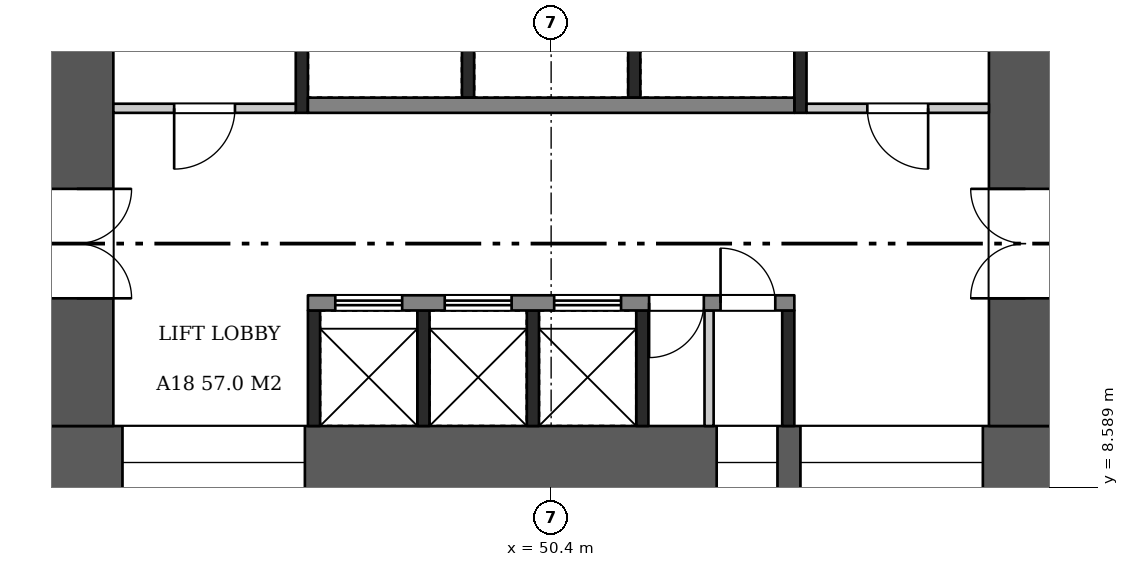
"""IFC4 building model, lengths in metres.
Left out: names, types, materials, properties, quantities, classifications, styles, units other than length and angle.
Written with IfcOpenShell. Run it as: python <this file> out.ifc"""

import sys

from ifc_helpers import new_model, si_unit, direction, frame, frame_2d, origin, place, context, subcontext, project, spatial, rectangle, extrude, element, fill, save


model = new_model("IFC4")
c1 = context("Model", 3, precision=1e-05, world=origin(), true_north=direction((0.0, 1.0)))
c2 = subcontext(c1, "Body", "Model", "MODEL_VIEW")
j1 = project(units=[si_unit("LENGTHUNIT", "METRE"), si_unit("PLANEANGLEUNIT", "RADIAN")], contexts=[c1])
p1 = place(None, origin())
s1 = spatial("IfcSite", under=j1, at=p1, CompositionType="ELEMENT")
p2 = place(p1, origin())
s2 = spatial("IfcBuilding", under=s1, at=p2, CompositionType="ELEMENT")
p3 = place(p2, frame((0.0, 0.0, 74.2)))
s3 = spatial("IfcBuildingStorey", under=s2, at=p3, CompositionType="ELEMENT", Elevation=74.2)
p4 = place(p3, frame((42.0, 9.0, 0.0), z_axis=(0.0, 0.0, 1.0), x_axis=(1.0, 0.0, 0.0)))
e1 = element("IfcWall", 1, at=p4, inside=s3, PredefinedType="SHEAR", context=c2, shape_type="SweptSolid", body=[
    extrude(rectangle(XDim=16.8, YDim=1.2, at=frame_2d((8.4, 0.0))), origin(), (0.0, 0.0, 1.0), 6.72),
])
p5 = place(p4, frame((1.35, 0.0, 0.6)))
e2 = element("IfcOpeningElement", 2, at=p5, cuts=e1, PredefinedType="OPENING", context=c2, shape_type="SweptSolid", body=[
    extrude(rectangle(XDim=3.0, YDim=2.1, at=frame_2d((1.5, 1.05))), frame((0.0, 0.61, 0.0), z_axis=(0.0, -1.0, 0.0), x_axis=(1.0, 0.0, 0.0)), (0.0, 0.0, 1.0), 1.22),
])
p6 = place(p4, frame((11.123, 0.0, 1.6)))
e3 = element("IfcOpeningElement", 3, at=p6, cuts=e1, PredefinedType="OPENING", context=c2, shape_type="SweptSolid", body=[
    extrude(rectangle(XDim=1.0, YDim=1.2, at=frame_2d((0.5, 0.6))), frame((0.0, 0.61, 0.0), z_axis=(0.0, -1.0, 0.0), x_axis=(1.0, 0.0, 0.0)), (0.0, 0.0, 1.0), 1.22),
])
p7 = place(p4, frame((12.5, 0.0, 0.6)))
e4 = element("IfcOpeningElement", 4, at=p7, cuts=e1, PredefinedType="OPENING", context=c2, shape_type="SweptSolid", body=[
    extrude(rectangle(XDim=3.0, YDim=2.1, at=frame_2d((1.5, 1.05))), frame((0.0, 0.61, 0.0), z_axis=(0.0, -1.0, 0.0), x_axis=(1.0, 0.0, 0.0)), (0.0, 0.0, 1.0), 1.22),
])
p8 = place(p3, frame((42.6, 9.6, 0.0), z_axis=(0.0, 0.0, 1.0), x_axis=(0.0, 1.0, 0.0)))
e5 = element("IfcWall", 5, at=p8, inside=s3, PredefinedType="SHEAR", context=c2, shape_type="SweptSolid", body=[
    extrude(rectangle(XDim=14.4, YDim=1.2, at=frame_2d((7.2, 0.0))), origin(), (0.0, 0.0, 1.0), 6.72),
])
p9 = place(p8, frame((2.1, 0.0, 0.0)))
e6 = element("IfcOpeningElement", 6, at=p9, cuts=e5, PredefinedType="OPENING", context=c2, shape_type="SweptSolid", body=[
    extrude(rectangle(XDim=1.8, YDim=2.1, at=frame_2d((0.9, 1.05))), frame((0.0, 0.61, 0.0), z_axis=(0.0, -1.0, 0.0), x_axis=(1.0, 0.0, 0.0)), (0.0, 0.0, 1.0), 1.22),
])
p10 = place(p3, frame((58.2, 9.6, 0.0), z_axis=(0.0, 0.0, 1.0), x_axis=(0.0, 1.0, 0.0)))
e7 = element("IfcWall", 7, at=p10, inside=s3, PredefinedType="SHEAR", context=c2, shape_type="SweptSolid", body=[
    extrude(rectangle(XDim=14.4, YDim=1.2, at=frame_2d((7.2, 0.0))), origin(), (0.0, 0.0, 1.0), 6.72),
])
p11 = place(p10, frame((2.1, 0.0, 0.0)))
e8 = element("IfcOpeningElement", 8, at=p11, cuts=e7, PredefinedType="OPENING", context=c2, shape_type="SweptSolid", body=[
    extrude(rectangle(XDim=1.8, YDim=2.1, at=frame_2d((0.9, 1.05))), frame((0.0, 0.61, 0.0), z_axis=(0.0, -1.0, 0.0), x_axis=(1.0, 0.0, 0.0)), (0.0, 0.0, 1.0), 1.22),
])
for number, where, z_axis, x_axis in (
    (9, (46.5, 9.6, 0.0), (0.0, 0.0, 1.0), (0.0, 1.0, 0.0)),
    (10, (48.3, 9.6, 0.0), (0.0, 0.0, 1.0), (0.0, 1.0, 0.0)),
    (11, (50.1, 9.6, 0.0), (0.0, 0.0, 1.0), (0.0, 1.0, 0.0)),
    (12, (51.9, 9.6, 0.0), (0.0, 0.0, 1.0), (0.0, 1.0, 0.0)),
    (13, (54.3, 9.6, 0.0), (0.0, 0.0, 1.0), (0.0, 1.0, 0.0)),
):
    element("IfcWall", number, at=place(p3, frame(where, z_axis=z_axis, x_axis=x_axis)), inside=s3, PredefinedType="SHEAR", context=c2, shape_type="SweptSolid", body=[
        extrude(rectangle(XDim=1.9, YDim=0.2, at=frame_2d((0.95, 0.0))), origin(), (0.0, 0.0, 1.0), 6.72),
    ])
p12 = place(p3, frame((52.998, 9.6, 0.0), z_axis=(0.0, 0.0, 1.0), x_axis=(0.0, 1.0, 0.0)))
e14 = element("IfcWall", 14, at=p12, inside=s3, PredefinedType="PARTITIONING", context=c2, shape_type="SweptSolid", body=[
    extrude(rectangle(XDim=1.9, YDim=0.15, at=frame_2d((0.95, 0.0))), origin(), (0.0, 0.0, 1.0), 6.72),
])
p13 = place(p3, frame((46.4, 11.625, 0.0), z_axis=(0.0, 0.0, 1.0), x_axis=(1.0, 0.0, 0.0)))
e15 = element("IfcWall", 15, at=p13, inside=s3, PredefinedType="SHEAR", context=c2, shape_type="SweptSolid", body=[
    extrude(rectangle(XDim=8.0, YDim=0.25, at=frame_2d((4.0, 0.0))), origin(), (0.0, 0.0, 1.0), 6.72),
])
p14 = place(p13, frame((0.45, 0.0, 0.0)))
e16 = element("IfcOpeningElement", 16, at=p14, cuts=e15, PredefinedType="OPENING", context=c2, shape_type="SweptSolid", body=[
    extrude(rectangle(XDim=1.1, YDim=2.1, at=frame_2d((0.55, 1.05))), frame((0.0, 0.135, 0.0), z_axis=(0.0, -1.0, 0.0), x_axis=(1.0, 0.0, 0.0)), (0.0, 0.0, 1.0), 0.27),
])
p15 = place(p13, frame((2.25, 0.0, 0.0)))
e17 = element("IfcOpeningElement", 17, at=p15, cuts=e15, PredefinedType="OPENING", context=c2, shape_type="SweptSolid", body=[
    extrude(rectangle(XDim=1.1, YDim=2.1, at=frame_2d((0.55, 1.05))), frame((0.0, 0.135, 0.0), z_axis=(0.0, -1.0, 0.0), x_axis=(1.0, 0.0, 0.0)), (0.0, 0.0, 1.0), 0.27),
])
p16 = place(p13, frame((4.05, 0.0, 0.0)))
e18 = element("IfcOpeningElement", 18, at=p16, cuts=e15, PredefinedType="OPENING", context=c2, shape_type="SweptSolid", body=[
    extrude(rectangle(XDim=1.1, YDim=2.1, at=frame_2d((0.55, 1.05))), frame((0.0, 0.135, 0.0), z_axis=(0.0, -1.0, 0.0), x_axis=(1.0, 0.0, 0.0)), (0.0, 0.0, 1.0), 0.27),
])
p17 = place(p13, frame((5.611, 0.0, 0.0)))
e19 = element("IfcOpeningElement", 19, at=p17, cuts=e15, PredefinedType="OPENING", context=c2, shape_type="SweptSolid", body=[
    extrude(rectangle(XDim=0.9, YDim=2.1, at=frame_2d((0.45, 1.05))), frame((0.0, 0.135, 0.0), z_axis=(0.0, -1.0, 0.0), x_axis=(1.0, 0.0, 0.0)), (0.0, 0.0, 1.0), 0.27),
])
p18 = place(p13, frame((6.786, 0.0, 0.0)))
e20 = element("IfcOpeningElement", 20, at=p18, cuts=e15, PredefinedType="OPENING", context=c2, shape_type="SweptSolid", body=[
    extrude(rectangle(XDim=0.9, YDim=2.1, at=frame_2d((0.45, 1.05))), frame((0.0, 0.135, 0.0), z_axis=(0.0, -1.0, 0.0), x_axis=(1.0, 0.0, 0.0)), (0.0, 0.0, 1.0), 0.27),
])
for number, where, z_axis, x_axis in (
    (21, (49.033, 15.0, 0.0), (0.0, 0.0, 1.0), (0.0, 1.0, 0.0)),
    (22, (51.767, 15.0, 0.0), (0.0, 0.0, 1.0), (0.0, 1.0, 0.0)),
):
    element("IfcWall", number, at=place(p3, frame(where, z_axis=z_axis, x_axis=x_axis)), inside=s3, PredefinedType="SHEAR", context=c2, shape_type="SweptSolid", body=[
        extrude(rectangle(XDim=1.9, YDim=0.2, at=frame_2d((0.95, 0.0))), origin(), (0.0, 0.0, 1.0), 6.72),
    ])
p19 = place(p3, frame((46.4, 14.875, 0.0), z_axis=(0.0, 0.0, 1.0), x_axis=(1.0, 0.0, 0.0)))
e23 = element("IfcWall", 23, at=p19, inside=s3, PredefinedType="SHEAR", context=c2, shape_type="SweptSolid", body=[
    extrude(rectangle(XDim=8.0, YDim=0.25, at=frame_2d((4.0, 0.0))), origin(), (0.0, 0.0, 1.0), 6.72),
])
p20 = place(p3, frame((46.3, 14.75, 0.0), z_axis=(0.0, 0.0, 1.0), x_axis=(0.0, 1.0, 0.0)))
e24 = element("IfcWall", 24, at=p20, inside=s3, PredefinedType="SHEAR", context=c2, shape_type="SweptSolid", body=[
    extrude(rectangle(XDim=2.4, YDim=0.2, at=frame_2d((1.2, 0.0))), origin(), (0.0, 0.0, 1.0), 6.72),
])
p21 = place(p3, frame((43.2, 14.825, 0.0), z_axis=(0.0, 0.0, 1.0), x_axis=(1.0, 0.0, 0.0)))
e25 = element("IfcWall", 25, at=p21, inside=s3, PredefinedType="PARTITIONING", context=c2, shape_type="SweptSolid", body=[
    extrude(rectangle(XDim=3.0, YDim=0.15, at=frame_2d((1.5, 0.0))), origin(), (0.0, 0.0, 1.0), 6.72),
])
p22 = place(p21, frame((1.0, 0.0, 0.0)))
e26 = element("IfcOpeningElement", 26, at=p22, cuts=e25, PredefinedType="OPENING", context=c2, shape_type="SweptSolid", body=[
    extrude(rectangle(XDim=1.0, YDim=2.1, at=frame_2d((0.5, 1.05))), frame((0.0, 0.085, 0.0), z_axis=(0.0, -1.0, 0.0), x_axis=(1.0, 0.0, 0.0)), (0.0, 0.0, 1.0), 0.17),
])
p23 = place(p3, frame((54.5, 14.75, 0.0), z_axis=(0.0, 0.0, 1.0), x_axis=(0.0, 1.0, 0.0)))
e27 = element("IfcWall", 27, at=p23, inside=s3, PredefinedType="SHEAR", context=c2, shape_type="SweptSolid", body=[
    extrude(rectangle(XDim=2.4, YDim=0.2, at=frame_2d((1.2, 0.0))), origin(), (0.0, 0.0, 1.0), 6.72),
])
p24 = place(p3, frame((54.6, 14.825, 0.0), z_axis=(0.0, 0.0, 1.0), x_axis=(1.0, 0.0, 0.0)))
e28 = element("IfcWall", 28, at=p24, inside=s3, PredefinedType="PARTITIONING", context=c2, shape_type="SweptSolid", body=[
    extrude(rectangle(XDim=3.0, YDim=0.15, at=frame_2d((1.5, 0.0))), origin(), (0.0, 0.0, 1.0), 6.72),
])
p25 = place(p24, frame((1.0, 0.0, 0.0)))
e29 = element("IfcOpeningElement", 29, at=p25, cuts=e28, PredefinedType="OPENING", context=c2, shape_type="SweptSolid", body=[
    extrude(rectangle(XDim=1.0, YDim=2.1, at=frame_2d((0.5, 1.05))), frame((0.0, 0.085, 0.0), z_axis=(0.0, -1.0, 0.0), x_axis=(1.0, 0.0, 0.0)), (0.0, 0.0, 1.0), 0.17),
])
p26 = place(p9, frame((1.8, 0.0, 0.0), z_axis=(0.0, 0.0, 1.0), x_axis=(-1.0, 0.0, 0.0)))
e30 = element("IfcDoor", 30, at=p26, inside=s3, OperationType="DOUBLE_DOOR_SINGLE_SWING", PredefinedType="DOOR", context=c2, shape_type="SweptSolid", body=[
    extrude(rectangle(XDim=1.8, YDim=2.1, at=frame_2d((0.9, 1.05))), frame((0.0, 0.025, 0.0), z_axis=(0.0, -1.0, 0.0), x_axis=(1.0, 0.0, 0.0)), (0.0, 0.0, 1.0), 0.05),
])
fill(e6, e30)
p27 = place(p11, origin())
e31 = element("IfcDoor", 31, at=p27, inside=s3, OperationType="DOUBLE_DOOR_SINGLE_SWING", PredefinedType="DOOR", context=c2, shape_type="SweptSolid", body=[
    extrude(rectangle(XDim=1.8, YDim=2.1, at=frame_2d((0.9, 1.05))), frame((0.0, 0.025, 0.0), z_axis=(0.0, -1.0, 0.0), x_axis=(1.0, 0.0, 0.0)), (0.0, 0.0, 1.0), 0.05),
])
fill(e8, e31)
p28 = place(p14, origin())
e32 = element("IfcDoor", 32, at=p28, inside=s3, OperationType="DOUBLE_DOOR_SLIDING", PredefinedType="DOOR", context=c2, shape_type="SweptSolid", body=[
    extrude(rectangle(XDim=1.1, YDim=2.1, at=frame_2d((0.55, 1.05))), frame((0.0, 0.025, 0.0), z_axis=(0.0, -1.0, 0.0), x_axis=(1.0, 0.0, 0.0)), (0.0, 0.0, 1.0), 0.05),
])
fill(e16, e32)
p29 = place(p15, origin())
e33 = element("IfcDoor", 33, at=p29, inside=s3, OperationType="DOUBLE_DOOR_SLIDING", PredefinedType="DOOR", context=c2, shape_type="SweptSolid", body=[
    extrude(rectangle(XDim=1.1, YDim=2.1, at=frame_2d((0.55, 1.05))), frame((0.0, 0.025, 0.0), z_axis=(0.0, -1.0, 0.0), x_axis=(1.0, 0.0, 0.0)), (0.0, 0.0, 1.0), 0.05),
])
fill(e17, e33)
p30 = place(p16, origin())
e34 = element("IfcDoor", 34, at=p30, inside=s3, OperationType="DOUBLE_DOOR_SLIDING", PredefinedType="DOOR", context=c2, shape_type="SweptSolid", body=[
    extrude(rectangle(XDim=1.1, YDim=2.1, at=frame_2d((0.55, 1.05))), frame((0.0, 0.025, 0.0), z_axis=(0.0, -1.0, 0.0), x_axis=(1.0, 0.0, 0.0)), (0.0, 0.0, 1.0), 0.05),
])
fill(e18, e34)
p31 = place(p17, frame((0.9, 0.0, 0.0), z_axis=(0.0, 0.0, 1.0), x_axis=(-1.0, 0.0, 0.0)))
e35 = element("IfcDoor", 35, at=p31, inside=s3, OperationType="SINGLE_SWING_RIGHT", PredefinedType="DOOR", context=c2, shape_type="SweptSolid", body=[
    extrude(rectangle(XDim=0.9, YDim=2.1, at=frame_2d((0.45, 1.05))), frame((0.0, 0.025, 0.0), z_axis=(0.0, -1.0, 0.0), x_axis=(1.0, 0.0, 0.0)), (0.0, 0.0, 1.0), 0.05),
])
fill(e19, e35)
p32 = place(p18, origin())
e36 = element("IfcDoor", 36, at=p32, inside=s3, OperationType="SINGLE_SWING_LEFT", PredefinedType="DOOR", context=c2, shape_type="SweptSolid", body=[
    extrude(rectangle(XDim=0.9, YDim=2.1, at=frame_2d((0.45, 1.05))), frame((0.0, 0.025, 0.0), z_axis=(0.0, -1.0, 0.0), x_axis=(1.0, 0.0, 0.0)), (0.0, 0.0, 1.0), 0.05),
])
fill(e20, e36)
p33 = place(p22, frame((1.0, 0.0, 0.0), z_axis=(0.0, 0.0, 1.0), x_axis=(-1.0, 0.0, 0.0)))
e37 = element("IfcDoor", 37, at=p33, inside=s3, OperationType="SINGLE_SWING_RIGHT", PredefinedType="DOOR", context=c2, shape_type="SweptSolid", body=[
    extrude(rectangle(XDim=1.0, YDim=2.1, at=frame_2d((0.5, 1.05))), frame((0.0, 0.025, 0.0), z_axis=(0.0, -1.0, 0.0), x_axis=(1.0, 0.0, 0.0)), (0.0, 0.0, 1.0), 0.05),
])
fill(e26, e37)
p34 = place(p25, frame((1.0, 0.0, 0.0), z_axis=(0.0, 0.0, 1.0), x_axis=(-1.0, 0.0, 0.0)))
e38 = element("IfcDoor", 38, at=p34, inside=s3, OperationType="SINGLE_SWING_LEFT", PredefinedType="DOOR", context=c2, shape_type="SweptSolid", body=[
    extrude(rectangle(XDim=1.0, YDim=2.1, at=frame_2d((0.5, 1.05))), frame((0.0, 0.025, 0.0), z_axis=(0.0, -1.0, 0.0), x_axis=(1.0, 0.0, 0.0)), (0.0, 0.0, 1.0), 0.05),
])
fill(e29, e38)
p35 = place(p5, origin())
e39 = element("IfcWindow", 39, at=p35, inside=s3, PartitioningType="SINGLE_PANEL", PredefinedType="WINDOW", context=c2, shape_type="SweptSolid", body=[
    extrude(rectangle(XDim=3.0, YDim=2.1, at=frame_2d((1.5, 1.05))), frame((0.0, 0.03, 0.0), z_axis=(0.0, -1.0, 0.0), x_axis=(1.0, 0.0, 0.0)), (0.0, 0.0, 1.0), 0.06),
])
fill(e2, e39)
p36 = place(p6, origin())
e40 = element("IfcWindow", 40, at=p36, inside=s3, PartitioningType="SINGLE_PANEL", PredefinedType="WINDOW", context=c2, shape_type="SweptSolid", body=[
    extrude(rectangle(XDim=1.0, YDim=1.2, at=frame_2d((0.5, 0.6))), frame((0.0, 0.03, 0.0), z_axis=(0.0, -1.0, 0.0), x_axis=(1.0, 0.0, 0.0)), (0.0, 0.0, 1.0), 0.06),
])
fill(e3, e40)
p37 = place(p7, origin())
e41 = element("IfcWindow", 41, at=p37, inside=s3, PartitioningType="SINGLE_PANEL", PredefinedType="WINDOW", context=c2, shape_type="SweptSolid", body=[
    extrude(rectangle(XDim=3.0, YDim=2.1, at=frame_2d((1.5, 1.05))), frame((0.0, 0.03, 0.0), z_axis=(0.0, -1.0, 0.0), x_axis=(1.0, 0.0, 0.0)), (0.0, 0.0, 1.0), 0.06),
])
fill(e4, e41)
save(model, sys.argv[1])
